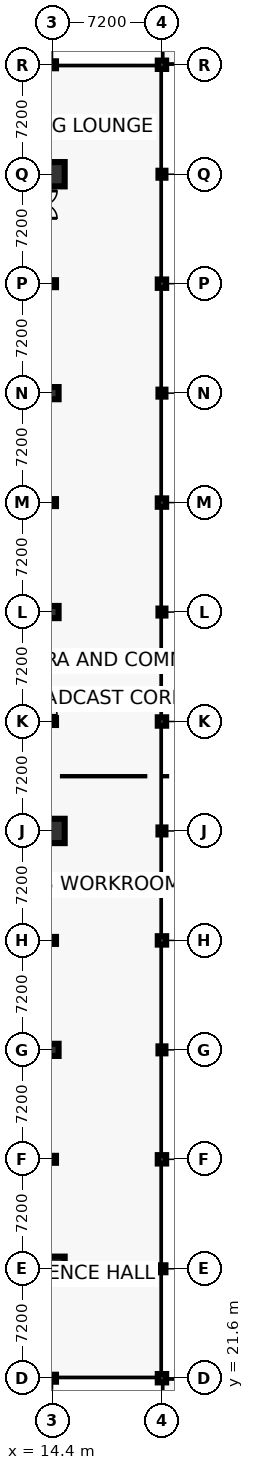
"""IFC4 building model, lengths in metres.
Left out: names, types, materials, properties, quantities, classifications, styles, units other than length and angle.
Written with IfcOpenShell. Run it as: python <this file> out.ifc"""

import sys

from ifc_helpers import new_model, si_unit, direction, frame, origin, origin_2d, place, context, subcontext, project, spatial, rectangle, circle, hollow_circle, extrude, element, save


model = new_model("IFC4")
c1 = context("Model", 3, precision=1e-05, world=origin(), true_north=direction((0.0, 1.0)))
c2 = subcontext(c1, "Body", "Model", "MODEL_VIEW")
j1 = project(units=[si_unit("LENGTHUNIT", "METRE"), si_unit("PLANEANGLEUNIT", "RADIAN")], contexts=[c1])
p1 = place(None, origin())
s1 = spatial("IfcSite", under=j1, at=p1, CompositionType="ELEMENT")
p2 = place(p1, origin())
s2 = spatial("IfcBuilding", under=s1, at=p2, CompositionType="ELEMENT")
p3 = place(p2, frame((0.0, 0.0, 18.6)))
s3 = spatial("IfcBuildingStorey", under=s2, at=p3, CompositionType="ELEMENT", Elevation=18.6)
p4 = place(p3, frame((14.4, 21.6, 0.0), z_axis=(0.0, 0.0, 1.0), x_axis=(1.0, 0.0, 0.0)))
e1 = element("IfcColumn", 1, at=p4, inside=s3, PredefinedType="COLUMN", context=c2, shape_type="SweptSolid", body=[
    extrude(hollow_circle(Radius=0.229, WallThickness=0.02, at=origin_2d()), origin(), (0.0, 0.0, 1.0), 4.4),
])
p5 = place(p3, frame((14.4, 28.8, 0.0), z_axis=(0.0, 0.0, 1.0), x_axis=(1.0, 0.0, 0.0)))
e2 = element("IfcColumn", 2, at=p5, inside=s3, PredefinedType="COLUMN", context=c2, shape_type="SweptSolid", body=[
    extrude(circle(Radius=0.8, at=origin_2d()), origin(), (0.0, 0.0, 1.0), 4.4),
])
p6 = place(p3, frame((14.4, 36.0, 0.0), z_axis=(0.0, 0.0, 1.0), x_axis=(1.0, 0.0, 0.0)))
e3 = element("IfcColumn", 3, at=p6, inside=s3, PredefinedType="COLUMN", context=c2, shape_type="SweptSolid", body=[
    extrude(hollow_circle(Radius=0.229, WallThickness=0.02, at=origin_2d()), origin(), (0.0, 0.0, 1.0), 4.4),
])
p7 = place(p3, frame((14.4, 43.2, 0.0), z_axis=(0.0, 0.0, 1.0), x_axis=(1.0, 0.0, 0.0)))
e4 = element("IfcColumn", 4, at=p7, inside=s3, PredefinedType="COLUMN", context=c2, shape_type="SweptSolid", body=[
    extrude(circle(Radius=0.4, at=origin_2d()), origin(), (0.0, 0.0, 1.0), 4.4),
])
p8 = place(p3, frame((14.4, 50.4, 0.0), z_axis=(0.0, 0.0, 1.0), x_axis=(1.0, 0.0, 0.0)))
e5 = element("IfcColumn", 5, at=p8, inside=s3, PredefinedType="COLUMN", context=c2, shape_type="SweptSolid", body=[
    extrude(hollow_circle(Radius=0.229, WallThickness=0.02, at=origin_2d()), origin(), (0.0, 0.0, 1.0), 4.4),
])
p9 = place(p3, frame((14.4, 57.6, 0.0), z_axis=(0.0, 0.0, 1.0), x_axis=(1.0, 0.0, 0.0)))
e6 = element("IfcColumn", 6, at=p9, inside=s3, PredefinedType="COLUMN", context=c2, shape_type="SweptSolid", body=[
    extrude(circle(Radius=0.8, at=origin_2d()), origin(), (0.0, 0.0, 1.0), 4.4),
])
p10 = place(p3, frame((14.4, 64.8, 0.0), z_axis=(0.0, 0.0, 1.0), x_axis=(1.0, 0.0, 0.0)))
e7 = element("IfcColumn", 7, at=p10, inside=s3, PredefinedType="COLUMN", context=c2, shape_type="SweptSolid", body=[
    extrude(hollow_circle(Radius=0.229, WallThickness=0.02, at=origin_2d()), origin(), (0.0, 0.0, 1.0), 4.4),
])
p11 = place(p3, frame((14.4, 72.0, 0.0), z_axis=(0.0, 0.0, 1.0), x_axis=(1.0, 0.0, 0.0)))
e8 = element("IfcColumn", 8, at=p11, inside=s3, PredefinedType="COLUMN", context=c2, shape_type="SweptSolid", body=[
    extrude(circle(Radius=0.4, at=origin_2d()), origin(), (0.0, 0.0, 1.0), 4.4),
])
p12 = place(p3, frame((14.4, 79.2, 0.0), z_axis=(0.0, 0.0, 1.0), x_axis=(1.0, 0.0, 0.0)))
e9 = element("IfcColumn", 9, at=p12, inside=s3, PredefinedType="COLUMN", context=c2, shape_type="SweptSolid", body=[
    extrude(hollow_circle(Radius=0.229, WallThickness=0.02, at=origin_2d()), origin(), (0.0, 0.0, 1.0), 4.4),
])
p13 = place(p3, frame((14.4, 86.4, 0.0), z_axis=(0.0, 0.0, 1.0), x_axis=(1.0, 0.0, 0.0)))
e10 = element("IfcColumn", 10, at=p13, inside=s3, PredefinedType="COLUMN", context=c2, shape_type="SweptSolid", body=[
    extrude(circle(Radius=0.4, at=origin_2d()), origin(), (0.0, 0.0, 1.0), 4.4),
])
p14 = place(p3, frame((14.4, 93.6, 0.0), z_axis=(0.0, 0.0, 1.0), x_axis=(1.0, 0.0, 0.0)))
e11 = element("IfcColumn", 11, at=p14, inside=s3, PredefinedType="COLUMN", context=c2, shape_type="SweptSolid", body=[
    extrude(hollow_circle(Radius=0.229, WallThickness=0.02, at=origin_2d()), origin(), (0.0, 0.0, 1.0), 4.4),
])
p15 = place(p3, frame((14.4, 100.8, 0.0), z_axis=(0.0, 0.0, 1.0), x_axis=(1.0, 0.0, 0.0)))
e12 = element("IfcColumn", 12, at=p15, inside=s3, PredefinedType="COLUMN", context=c2, shape_type="SweptSolid", body=[
    extrude(circle(Radius=0.8, at=origin_2d()), origin(), (0.0, 0.0, 1.0), 4.4),
])
p16 = place(p3, frame((14.4, 108.0, 0.0), z_axis=(0.0, 0.0, 1.0), x_axis=(1.0, 0.0, 0.0)))
e13 = element("IfcColumn", 13, at=p16, inside=s3, PredefinedType="COLUMN", context=c2, shape_type="SweptSolid", body=[
    extrude(hollow_circle(Radius=0.229, WallThickness=0.02, at=origin_2d()), origin(), (0.0, 0.0, 1.0), 4.4),
])
p17 = place(p3, frame((21.6, 21.6, 0.0), z_axis=(0.0, 0.0, 1.0), x_axis=(1.0, 0.0, 0.0)))
e14 = element("IfcColumn", 14, at=p17, inside=s3, PredefinedType="COLUMN", context=c2, shape_type="SweptSolid", body=[
    extrude(rectangle(XDim=0.55, YDim=0.55, at=origin_2d()), origin(), (0.0, 0.0, 1.0), 4.4),
])
p18 = place(p3, frame((21.6, 28.8, 0.0), z_axis=(0.0, 0.0, 1.0), x_axis=(1.0, 0.0, 0.0)))
e15 = element("IfcColumn", 15, at=p18, inside=s3, PredefinedType="COLUMN", context=c2, shape_type="SweptSolid", body=[
    extrude(hollow_circle(Radius=0.229, WallThickness=0.02, at=origin_2d()), origin(), (0.0, 0.0, 1.0), 4.4),
])
p19 = place(p3, frame((21.6, 36.0, 0.0), z_axis=(0.0, 0.0, 1.0), x_axis=(1.0, 0.0, 0.0)))
e16 = element("IfcColumn", 16, at=p19, inside=s3, PredefinedType="COLUMN", context=c2, shape_type="SweptSolid", body=[
    extrude(rectangle(XDim=0.55, YDim=0.55, at=origin_2d()), origin(), (0.0, 0.0, 1.0), 4.4),
])
p20 = place(p3, frame((21.6, 43.2, 0.0), z_axis=(0.0, 0.0, 1.0), x_axis=(1.0, 0.0, 0.0)))
e17 = element("IfcColumn", 17, at=p20, inside=s3, PredefinedType="COLUMN", context=c2, shape_type="SweptSolid", body=[
    extrude(hollow_circle(Radius=0.229, WallThickness=0.02, at=origin_2d()), origin(), (0.0, 0.0, 1.0), 4.4),
])
p21 = place(p3, frame((21.6, 50.4, 0.0), z_axis=(0.0, 0.0, 1.0), x_axis=(1.0, 0.0, 0.0)))
e18 = element("IfcColumn", 18, at=p21, inside=s3, PredefinedType="COLUMN", context=c2, shape_type="SweptSolid", body=[
    extrude(rectangle(XDim=0.55, YDim=0.55, at=origin_2d()), origin(), (0.0, 0.0, 1.0), 4.4),
])
p22 = place(p3, frame((21.6, 57.6, 0.0), z_axis=(0.0, 0.0, 1.0), x_axis=(1.0, 0.0, 0.0)))
e19 = element("IfcColumn", 19, at=p22, inside=s3, PredefinedType="COLUMN", context=c2, shape_type="SweptSolid", body=[
    extrude(hollow_circle(Radius=0.229, WallThickness=0.02, at=origin_2d()), origin(), (0.0, 0.0, 1.0), 4.4),
])
p23 = place(p3, frame((21.6, 64.8, 0.0), z_axis=(0.0, 0.0, 1.0), x_axis=(1.0, 0.0, 0.0)))
e20 = element("IfcColumn", 20, at=p23, inside=s3, PredefinedType="COLUMN", context=c2, shape_type="SweptSolid", body=[
    extrude(rectangle(XDim=0.55, YDim=0.55, at=origin_2d()), origin(), (0.0, 0.0, 1.0), 4.4),
])
p24 = place(p3, frame((21.6, 72.0, 0.0), z_axis=(0.0, 0.0, 1.0), x_axis=(1.0, 0.0, 0.0)))
e21 = element("IfcColumn", 21, at=p24, inside=s3, PredefinedType="COLUMN", context=c2, shape_type="SweptSolid", body=[
    extrude(hollow_circle(Radius=0.229, WallThickness=0.02, at=origin_2d()), origin(), (0.0, 0.0, 1.0), 4.4),
])
p25 = place(p3, frame((21.6, 79.2, 0.0), z_axis=(0.0, 0.0, 1.0), x_axis=(1.0, 0.0, 0.0)))
e22 = element("IfcColumn", 22, at=p25, inside=s3, PredefinedType="COLUMN", context=c2, shape_type="SweptSolid", body=[
    extrude(rectangle(XDim=0.55, YDim=0.55, at=origin_2d()), origin(), (0.0, 0.0, 1.0), 4.4),
])
p26 = place(p3, frame((21.6, 86.4, 0.0), z_axis=(0.0, 0.0, 1.0), x_axis=(1.0, 0.0, 0.0)))
e23 = element("IfcColumn", 23, at=p26, inside=s3, PredefinedType="COLUMN", context=c2, shape_type="SweptSolid", body=[
    extrude(hollow_circle(Radius=0.229, WallThickness=0.02, at=origin_2d()), origin(), (0.0, 0.0, 1.0), 4.4),
])
p27 = place(p3, frame((21.6, 93.6, 0.0), z_axis=(0.0, 0.0, 1.0), x_axis=(1.0, 0.0, 0.0)))
e24 = element("IfcColumn", 24, at=p27, inside=s3, PredefinedType="COLUMN", context=c2, shape_type="SweptSolid", body=[
    extrude(rectangle(XDim=0.55, YDim=0.55, at=origin_2d()), origin(), (0.0, 0.0, 1.0), 4.4),
])
p28 = place(p3, frame((21.6, 100.8, 0.0), z_axis=(0.0, 0.0, 1.0), x_axis=(1.0, 0.0, 0.0)))
e25 = element("IfcColumn", 25, at=p28, inside=s3, PredefinedType="COLUMN", context=c2, shape_type="SweptSolid", body=[
    extrude(hollow_circle(Radius=0.229, WallThickness=0.02, at=origin_2d()), origin(), (0.0, 0.0, 1.0), 4.4),
])
p29 = place(p3, frame((21.6, 108.0, 0.0), z_axis=(0.0, 0.0, 1.0), x_axis=(1.0, 0.0, 0.0)))
e26 = element("IfcColumn", 26, at=p29, inside=s3, PredefinedType="COLUMN", context=c2, shape_type="SweptSolid", body=[
    extrude(rectangle(XDim=0.55, YDim=0.55, at=origin_2d()), origin(), (0.0, 0.0, 1.0), 4.4),
])
save(model, sys.argv[1])
